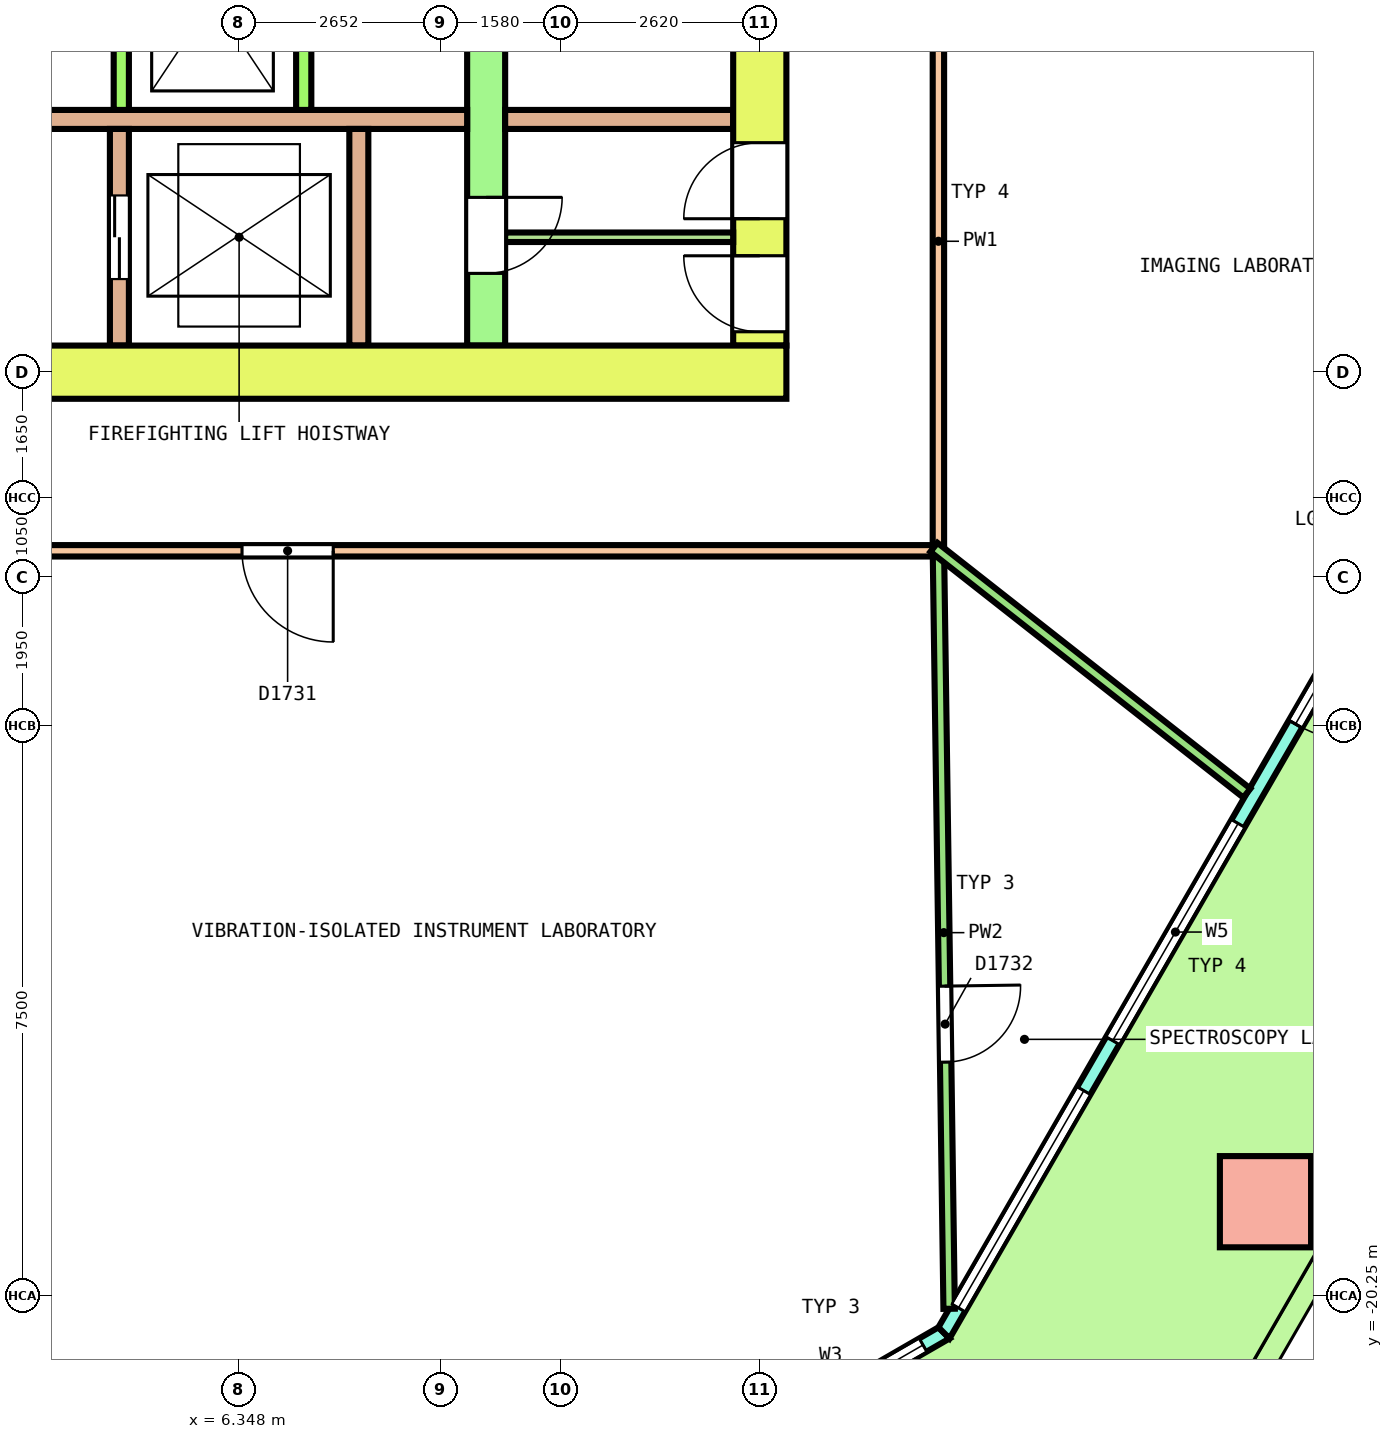
"""IFC4 building model, lengths in metres.
Left out: names, types, materials, properties, quantities, classifications, styles, units other than length and angle.
Written with IfcOpenShell. Run it as: python <this file> out.ifc"""

import sys

from ifc_helpers import new_model, si_unit, direction, frame, frame_2d, origin, origin_2d, place, context, subcontext, project, spatial, polyline, rectangle, outline, extrude, element, fill, save


model = new_model("IFC4")
c1 = context("Model", 3, precision=1e-05, world=origin(), true_north=direction((0.0, 1.0)))
c2 = subcontext(c1, "Body", "Model", "MODEL_VIEW")
j1 = project(units=[si_unit("LENGTHUNIT", "METRE"), si_unit("PLANEANGLEUNIT", "RADIAN")], contexts=[c1])
p1 = place(None, origin())
s1 = spatial("IfcSite", under=j1, at=p1, CompositionType="ELEMENT")
p2 = place(p1, origin())
s2 = spatial("IfcBuilding", under=s1, at=p2, CompositionType="ELEMENT")
p3 = place(p2, frame((0.0, 0.0, 154.0)))
s3 = spatial("IfcBuildingStorey", under=s2, at=p3, CompositionType="ELEMENT", Elevation=154.0)
p4 = place(p3, frame((19.853, -19.013, 0.0), z_axis=(-0.010847994403, -0.018863456933, 0.999763217472), x_axis=(0.498562459177, 0.866580616749, 0.02176026136)))
e1 = element("IfcColumn", 1, at=p4, inside=s3, PredefinedType="COLUMN", context=c2, shape_type="SweptSolid", body=[
    extrude(rectangle(XDim=1.2, YDim=1.2, at=origin_2d()), origin(), (0.0, 0.0, 1.0), 4.051),
])
p5 = place(p3, frame((9.67, -24.177, 0.0), z_axis=(0.0, 0.0, 1.0), x_axis=(0.866029458321, 0.49999297727, 0.0)))
e2 = element("IfcWall", 2, at=p5, inside=s3, PredefinedType="SOLIDWALL", context=c2, shape_type="SweptSolid", body=[
    extrude(outline(polyline([(-0.027, -0.1), (1.128, -0.1), (2.282, -0.1), (3.437, -0.1), (4.592, -0.1), (5.747, -0.1), (6.901, -0.1), (6.848, 0.1), (5.711, 0.1), (4.574, 0.1), (3.437, 0.1), (2.301, 0.1), (1.164, 0.1), (0.027, 0.1), (-0.027, -0.1)])), origin(), (0.0, 0.0, 1.0), 4.1),
])
p6 = place(p5, frame((0.319, 0.0, 0.1)))
e3 = element("IfcOpeningElement", 3, at=p6, cuts=e2, PredefinedType="OPENING", context=c2, shape_type="SweptSolid", body=[
    extrude(rectangle(XDim=2.8, YDim=2.9, at=frame_2d((1.4, 1.45))), frame((0.0, 0.11, 0.0), z_axis=(0.0, -1.0, 0.0), x_axis=(1.0, 0.0, 0.0)), (0.0, 0.0, 1.0), 0.22),
])
p7 = place(p5, frame((3.756, 0.0, 0.1)))
e4 = element("IfcOpeningElement", 4, at=p7, cuts=e2, PredefinedType="OPENING", context=c2, shape_type="SweptSolid", body=[
    extrude(rectangle(XDim=2.8, YDim=2.9, at=frame_2d((1.4, 1.45))), frame((0.0, 0.11, 0.0), z_axis=(0.0, -1.0, 0.0), x_axis=(1.0, 0.0, 0.0)), (0.0, 0.0, 1.0), 0.22),
])
p8 = place(p3, frame((15.624, -20.739, 0.0), z_axis=(0.0, 0.0, 1.0), x_axis=(0.500001833672, 0.866024345111, 0.0)))
e5 = element("IfcWall", 5, at=p8, inside=s3, PredefinedType="SOLIDWALL", context=c2, shape_type="SweptSolid", body=[
    extrude(outline(polyline([(-0.027, -0.1), (0.991, -0.1), (2.008, -0.1), (3.026, -0.1), (4.043, -0.1), (5.061, -0.1), (6.079, -0.1), (7.096, -0.1), (8.114, -0.1), (9.131, -0.1), (10.149, -0.1), (11.167, -0.1), (12.184, -0.1), (13.202, -0.1), (14.219, -0.1), (15.237, -0.1), (16.254, -0.1), (17.272, -0.1), (18.29, -0.1), (19.307, -0.1), (20.325, -0.1), (20.271, 0.1), (19.259, 0.1), (18.247, 0.1), (17.234, 0.1), (16.222, 0.1), (15.21, 0.1), (14.198, 0.1), (13.186, 0.1), (12.173, 0.1), (11.161, 0.1), (10.149, 0.1), (9.137, 0.1), (8.125, 0.1), (7.112, 0.1), (6.1, 0.1), (5.088, 0.1), (4.076, 0.1), (3.063, 0.1), (2.051, 0.1), (1.039, 0.1), (0.027, 0.1), (-0.027, -0.1)])), origin(), (0.0, 0.0, 1.0), 4.1),
])
p9 = place(p8, frame((0.38, 0.0, 0.1)))
e6 = element("IfcOpeningElement", 6, at=p9, cuts=e5, PredefinedType="OPENING", context=c2, shape_type="SweptSolid", body=[
    extrude(rectangle(XDim=3.3, YDim=2.9, at=frame_2d((1.65, 1.45))), frame((0.0, 0.11, 0.0), z_axis=(0.0, -1.0, 0.0), x_axis=(1.0, 0.0, 0.0)), (0.0, 0.0, 1.0), 0.22),
])
p10 = place(p8, frame((4.439, 0.0, 0.1)))
e7 = element("IfcOpeningElement", 7, at=p10, cuts=e5, PredefinedType="OPENING", context=c2, shape_type="SweptSolid", body=[
    extrude(rectangle(XDim=3.3, YDim=2.9, at=frame_2d((1.65, 1.45))), frame((0.0, 0.11, 0.0), z_axis=(0.0, -1.0, 0.0), x_axis=(1.0, 0.0, 0.0)), (0.0, 0.0, 1.0), 0.22),
])
p11 = place(p8, frame((9.249, 0.0, 0.0)))
e8 = element("IfcOpeningElement", 8, at=p11, cuts=e5, PredefinedType="OPENING", context=c2, shape_type="SweptSolid", body=[
    extrude(rectangle(XDim=1.8, YDim=2.4, at=frame_2d((0.9, 1.2))), frame((0.0, 0.11, 0.0), z_axis=(0.0, -1.0, 0.0), x_axis=(1.0, 0.0, 0.0)), (0.0, 0.0, 1.0), 0.22),
])
p12 = place(p8, frame((9.249, 0.0, 2.55)))
e9 = element("IfcOpeningElement", 9, at=p12, cuts=e5, PredefinedType="OPENING", context=c2, shape_type="SweptSolid", body=[
    extrude(rectangle(XDim=1.8, YDim=0.45, at=frame_2d((0.9, 0.225))), frame((0.0, 0.11, 0.0), z_axis=(0.0, -1.0, 0.0), x_axis=(1.0, 0.0, 0.0)), (0.0, 0.0, 1.0), 0.22),
])
p13 = place(p8, frame((12.559, 0.0, 0.1)))
e10 = element("IfcOpeningElement", 10, at=p13, cuts=e5, PredefinedType="OPENING", context=c2, shape_type="SweptSolid", body=[
    extrude(rectangle(XDim=3.3, YDim=2.9, at=frame_2d((1.65, 1.45))), frame((0.0, 0.11, 0.0), z_axis=(0.0, -1.0, 0.0), x_axis=(1.0, 0.0, 0.0)), (0.0, 0.0, 1.0), 0.22),
])
p14 = place(p8, frame((16.618, 0.0, 0.1)))
e11 = element("IfcOpeningElement", 11, at=p14, cuts=e5, PredefinedType="OPENING", context=c2, shape_type="SweptSolid", body=[
    extrude(rectangle(XDim=3.3, YDim=2.9, at=frame_2d((1.65, 1.45))), frame((0.0, 0.11, 0.0), z_axis=(0.0, -1.0, 0.0), x_axis=(1.0, 0.0, 0.0)), (0.0, 0.0, 1.0), 0.22),
])
p15 = place(p3, frame((-13.55, -8.1, 0.0), z_axis=(0.0, 0.0, 1.0), x_axis=(1.0, 0.0, 0.0)))
e12 = element("IfcWall", 12, at=p15, inside=s3, PredefinedType="SHEAR", context=c2, shape_type="SweptSolid", body=[
    extrude(rectangle(XDim=27.1, YDim=0.7, at=frame_2d((13.55, 0.0))), origin(), (0.0, 0.0, 1.0), 4.1),
])
p16 = place(p15, frame((15.1, 0.0, 0.0)))
e13 = element("IfcOpeningElement", 13, at=p16, cuts=e12, PredefinedType="OPENING", context=c2, shape_type="SweptSolid", body=[
    extrude(rectangle(XDim=1.2, YDim=2.1, at=frame_2d((0.6, 1.05))), frame((0.0, 0.36, 0.0), z_axis=(0.0, -1.0, 0.0), x_axis=(1.0, 0.0, 0.0)), (0.0, 0.0, 1.0), 0.72),
])
p17 = place(p3, frame((13.2, -7.75, 0.0), z_axis=(0.0, 0.0, 1.0), x_axis=(0.0, 1.0, 0.0)))
e14 = element("IfcWall", 14, at=p17, inside=s3, PredefinedType="SHEAR", context=c2, shape_type="SweptSolid", body=[
    extrude(rectangle(XDim=15.5, YDim=0.7, at=frame_2d((7.75, 0.0))), origin(), (0.0, 0.0, 1.0), 4.1),
])
p18 = place(p17, frame((6.55, 0.0, 0.0)))
e15 = element("IfcOpeningElement", 15, at=p18, cuts=e14, PredefinedType="OPENING", context=c2, shape_type="SweptSolid", body=[
    extrude(rectangle(XDim=2.4, YDim=2.1, at=frame_2d((1.2, 1.05))), frame((0.0, 0.36, 0.0), z_axis=(0.0, -1.0, 0.0), x_axis=(1.0, 0.0, 0.0)), (0.0, 0.0, 1.0), 0.72),
])
p19 = place(p17, frame((13.45, 0.0, 0.0)))
e16 = element("IfcOpeningElement", 16, at=p19, cuts=e14, PredefinedType="OPENING", context=c2, shape_type="SweptSolid", body=[
    extrude(rectangle(XDim=1.2, YDim=2.1, at=frame_2d((0.6, 1.05))), frame((0.0, 0.36, 0.0), z_axis=(0.0, -1.0, 0.0), x_axis=(1.0, 0.0, 0.0)), (0.0, 0.0, 1.0), 0.72),
])
p20 = place(p17, frame((0.181, 0.0, 0.0)))
e17 = element("IfcOpeningElement", 17, at=p20, cuts=e14, PredefinedType="OPENING", context=c2, shape_type="SweptSolid", body=[
    extrude(rectangle(XDim=1.0, YDim=2.1, at=frame_2d((0.5, 1.05))), frame((0.0, 0.36, 0.0), z_axis=(0.0, -1.0, 0.0), x_axis=(1.0, 0.0, 0.0)), (0.0, 0.0, 1.0), 0.72),
])
p21 = place(p17, frame((1.669, 0.0, 0.0)))
e18 = element("IfcOpeningElement", 18, at=p21, cuts=e14, PredefinedType="OPENING", context=c2, shape_type="SweptSolid", body=[
    extrude(rectangle(XDim=1.0, YDim=2.1, at=frame_2d((0.5, 1.05))), frame((0.0, 0.36, 0.0), z_axis=(0.0, -1.0, 0.0), x_axis=(1.0, 0.0, 0.0)), (0.0, 0.0, 1.0), 0.72),
])
p22 = place(p3, frame((9.6, -7.75, 0.0), z_axis=(0.0, 0.0, 1.0), x_axis=(0.0, 1.0, 0.0)))
e19 = element("IfcWall", 19, at=p22, inside=s3, PredefinedType="SHEAR", context=c2, shape_type="SweptSolid", body=[
    extrude(rectangle(XDim=15.5, YDim=0.5, at=frame_2d((7.75, 0.0))), origin(), (0.0, 0.0, 1.0), 4.1),
])
p23 = place(p22, frame((6.55, 0.0, 0.0)))
e20 = element("IfcOpeningElement", 20, at=p23, cuts=e19, PredefinedType="OPENING", context=c2, shape_type="SweptSolid", body=[
    extrude(rectangle(XDim=2.4, YDim=2.1, at=frame_2d((1.2, 1.05))), frame((0.0, 0.26, 0.0), z_axis=(0.0, -1.0, 0.0), x_axis=(1.0, 0.0, 0.0)), (0.0, 0.0, 1.0), 0.52),
])
p24 = place(p22, frame((13.45, 0.0, 0.0)))
e21 = element("IfcOpeningElement", 21, at=p24, cuts=e19, PredefinedType="OPENING", context=c2, shape_type="SweptSolid", body=[
    extrude(rectangle(XDim=1.2, YDim=2.1, at=frame_2d((0.6, 1.05))), frame((0.0, 0.26, 0.0), z_axis=(0.0, -1.0, 0.0), x_axis=(1.0, 0.0, 0.0)), (0.0, 0.0, 1.0), 0.52),
])
p25 = place(p22, frame((0.95, 0.0, 0.0)))
e22 = element("IfcOpeningElement", 22, at=p25, cuts=e19, PredefinedType="OPENING", context=c2, shape_type="SweptSolid", body=[
    extrude(rectangle(XDim=1.0, YDim=2.1, at=frame_2d((0.5, 1.05))), frame((0.0, 0.26, 0.0), z_axis=(0.0, -1.0, 0.0), x_axis=(1.0, 0.0, 0.0)), (0.0, 0.0, 1.0), 0.52),
])
p26 = place(p3, frame((-9.35, -4.775, 0.0), z_axis=(0.0, 0.0, 1.0), x_axis=(1.0, 0.0, 0.0)))
e23 = element("IfcWall", 23, at=p26, inside=s3, PredefinedType="SOLIDWALL", context=c2, shape_type="SweptSolid", body=[
    extrude(rectangle(XDim=18.7, YDim=0.25, at=frame_2d((9.35, 0.0))), origin(), (0.0, 0.0, 1.0), 4.1),
])
p27 = place(p3, frame((9.85, -4.775, 0.0), z_axis=(0.0, 0.0, 1.0), x_axis=(1.0, 0.0, 0.0)))
e24 = element("IfcWall", 24, at=p27, inside=s3, PredefinedType="SOLIDWALL", context=c2, shape_type="SweptSolid", body=[
    extrude(rectangle(XDim=3.0, YDim=0.25, at=frame_2d((1.5, 0.0))), origin(), (0.0, 0.0, 1.0), 4.1),
])
for number, where, z_axis, x_axis in (
    (25, (4.8, -4.65, 0.0), (0.0, 0.0, 1.0), (0.0, 1.0, 0.0)),
    (26, (7.2, -4.65, 0.0), (0.0, 0.0, 1.0), (0.0, 1.0, 0.0)),
):
    element("IfcWall", number, at=place(p3, frame(where, z_axis=z_axis, x_axis=x_axis)), inside=s3, PredefinedType="SOLIDWALL", context=c2, shape_type="SweptSolid", body=[
        extrude(rectangle(XDim=2.9, YDim=0.2, at=frame_2d((1.45, 0.0))), origin(), (0.0, 0.0, 1.0), 4.1),
    ])
p28 = place(p3, frame((4.775, -7.75, 0.0), z_axis=(0.0, 0.0, 1.0), x_axis=(0.0, 1.0, 0.0)))
e27 = element("IfcWall", 27, at=p28, inside=s3, PredefinedType="SOLIDWALL", context=c2, shape_type="SweptSolid", body=[
    extrude(rectangle(XDim=2.85, YDim=0.25, at=frame_2d((1.425, 0.0))), origin(), (0.0, 0.0, 1.0), 4.1),
])
p29 = place(p28, frame((0.875, 0.0, 0.0)))
e28 = element("IfcOpeningElement", 28, at=p29, cuts=e27, PredefinedType="OPENING", context=c2, shape_type="SweptSolid", body=[
    extrude(rectangle(XDim=1.1, YDim=2.1, at=frame_2d((0.55, 1.05))), frame((0.0, 0.135, 0.0), z_axis=(0.0, -1.0, 0.0), x_axis=(1.0, 0.0, 0.0)), (0.0, 0.0, 1.0), 0.27),
])
p30 = place(p3, frame((7.925, -7.75, 0.0), z_axis=(0.0, 0.0, 1.0), x_axis=(0.0, 1.0, 0.0)))
e29 = element("IfcWall", 29, at=p30, inside=s3, PredefinedType="SOLIDWALL", context=c2, shape_type="SweptSolid", body=[
    extrude(rectangle(XDim=2.85, YDim=0.25, at=frame_2d((1.425, 0.0))), origin(), (0.0, 0.0, 1.0), 4.1),
])
p31 = place(p3, frame((9.85, -6.325, 0.0), z_axis=(0.0, 0.0, 1.0), x_axis=(1.0, 0.0, 0.0)))
e30 = element("IfcWall", 30, at=p31, inside=s3, PredefinedType="PARTITIONING", context=c2, shape_type="SweptSolid", body=[
    extrude(rectangle(XDim=3.0, YDim=0.125, at=frame_2d((1.5, 0.0))), origin(), (0.0, 0.0, 1.0), 4.1),
])
p32 = place(p3, frame((15.55, -10.375, 0.0), z_axis=(0.0, 0.0, 1.0), x_axis=(0.0, 1.0, 0.0)))
e31 = element("IfcWall", 31, at=p32, inside=s3, PredefinedType="PARTITIONING", context=c2, shape_type="SweptSolid", body=[
    extrude(rectangle(XDim=7.994, YDim=0.15, at=frame_2d((3.997, 0.0))), origin(), (0.0, 0.0, 1.0), 3.05),
])
p33 = place(p3, frame((-15.475, -10.45, 0.0), z_axis=(0.0, 0.0, 1.0), x_axis=(1.0, 0.0, 0.0)))
e32 = element("IfcWall", 32, at=p33, inside=s3, PredefinedType="PARTITIONING", context=c2, shape_type="SweptSolid", body=[
    extrude(rectangle(XDim=30.95, YDim=0.15, at=frame_2d((15.475, 0.0))), origin(), (0.0, 0.0, 1.0), 3.05),
])
p34 = place(p33, frame((10.408, 0.0, 0.0)))
e33 = element("IfcOpeningElement", 33, at=p34, cuts=e32, PredefinedType="OPENING", context=c2, shape_type="SweptSolid", body=[
    extrude(rectangle(XDim=1.2, YDim=2.1, at=frame_2d((0.6, 1.05))), frame((0.0, 0.085, 0.0), z_axis=(0.0, -1.0, 0.0), x_axis=(1.0, 0.0, 0.0)), (0.0, 0.0, 1.0), 0.17),
])
p35 = place(p33, frame((21.863, 0.0, 0.0)))
e34 = element("IfcOpeningElement", 34, at=p35, cuts=e32, PredefinedType="OPENING", context=c2, shape_type="SweptSolid", body=[
    extrude(rectangle(XDim=1.2, YDim=2.1, at=frame_2d((0.6, 1.05))), frame((0.0, 0.085, 0.0), z_axis=(0.0, -1.0, 0.0), x_axis=(1.0, 0.0, 0.0)), (0.0, 0.0, 1.0), 0.17),
])
p36 = place(p3, frame((15.551, -10.525, 0.0), z_axis=(0.0, 0.0, 1.0), x_axis=(0.014157785589, -0.999899773531, 0.0)))
e35 = element("IfcWall", 35, at=p36, inside=s3, PredefinedType="PARTITIONING", context=c2, shape_type="SweptSolid", body=[
    extrude(rectangle(XDim=9.898, YDim=0.15, at=frame_2d((4.949, 0.0))), origin(), (0.0, 0.0, 1.0), 3.05),
])
p37 = place(p36, frame((5.653, 0.0, 0.0)))
e36 = element("IfcOpeningElement", 36, at=p37, cuts=e35, PredefinedType="OPENING", context=c2, shape_type="SweptSolid", body=[
    extrude(rectangle(XDim=1.0, YDim=2.1, at=frame_2d((0.5, 1.05))), frame((0.0, 0.085, 0.0), z_axis=(0.0, -1.0, 0.0), x_axis=(1.0, 0.0, 0.0)), (0.0, 0.0, 1.0), 0.17),
])
p38 = place(p3, frame((15.491, -10.404, 0.0), z_axis=(0.0, 0.0, 1.0), x_axis=(0.78641541947, -0.617697974757, 0.0)))
e37 = element("IfcWall", 37, at=p38, inside=s3, PredefinedType="PARTITIONING", context=c2, shape_type="SweptSolid", body=[
    extrude(rectangle(XDim=5.235, YDim=0.15, at=frame_2d((2.618, 0.0))), origin(), (0.0, 0.0, 1.0), 3.05),
])
p39 = place(p7, origin())
e38 = element("IfcWindow", 38, at=p39, inside=s3, PartitioningType="SINGLE_PANEL", PredefinedType="WINDOW", context=c2, shape_type="SweptSolid", body=[
    extrude(rectangle(XDim=2.8, YDim=2.9, at=frame_2d((1.4, 1.45))), frame((0.0, 0.03, 0.0), z_axis=(0.0, -1.0, 0.0), x_axis=(1.0, 0.0, 0.0)), (0.0, 0.0, 1.0), 0.06),
])
fill(e4, e38)
p40 = place(p9, origin())
e39 = element("IfcWindow", 39, at=p40, inside=s3, PartitioningType="SINGLE_PANEL", PredefinedType="WINDOW", context=c2, shape_type="SweptSolid", body=[
    extrude(rectangle(XDim=3.3, YDim=2.9, at=frame_2d((1.65, 1.45))), frame((0.0, 0.03, 0.0), z_axis=(0.0, -1.0, 0.0), x_axis=(1.0, 0.0, 0.0)), (0.0, 0.0, 1.0), 0.06),
])
fill(e6, e39)
p41 = place(p10, origin())
e40 = element("IfcWindow", 40, at=p41, inside=s3, PartitioningType="SINGLE_PANEL", PredefinedType="WINDOW", context=c2, shape_type="SweptSolid", body=[
    extrude(rectangle(XDim=3.3, YDim=2.9, at=frame_2d((1.65, 1.45))), frame((0.0, 0.03, 0.0), z_axis=(0.0, -1.0, 0.0), x_axis=(1.0, 0.0, 0.0)), (0.0, 0.0, 1.0), 0.06),
])
fill(e7, e40)
p42 = place(p11, origin())
e41 = element("IfcDoor", 41, at=p42, inside=s3, OperationType="DOUBLE_DOOR_SINGLE_SWING", PredefinedType="DOOR", context=c2, shape_type="SweptSolid", body=[
    extrude(rectangle(XDim=1.8, YDim=2.4, at=frame_2d((0.9, 1.2))), frame((0.0, 0.025, 0.0), z_axis=(0.0, -1.0, 0.0), x_axis=(1.0, 0.0, 0.0)), (0.0, 0.0, 1.0), 0.05),
])
fill(e8, e41)
p43 = place(p12, origin())
e42 = element("IfcWindow", 42, at=p43, inside=s3, PartitioningType="SINGLE_PANEL", PredefinedType="WINDOW", context=c2, shape_type="SweptSolid", body=[
    extrude(rectangle(XDim=1.8, YDim=0.45, at=frame_2d((0.9, 0.225))), frame((0.0, 0.03, 0.0), z_axis=(0.0, -1.0, 0.0), x_axis=(1.0, 0.0, 0.0)), (0.0, 0.0, 1.0), 0.06),
])
fill(e9, e42)
p44 = place(p29, origin())
e43 = element("IfcDoor", 43, at=p44, inside=s3, OperationType="DOUBLE_DOOR_SLIDING", PredefinedType="DOOR", context=c2, shape_type="SweptSolid", body=[
    extrude(rectangle(XDim=1.1, YDim=2.1, at=frame_2d((0.55, 1.05))), frame((0.0, 0.075, 0.0), z_axis=(0.0, -1.0, 0.0), x_axis=(1.0, 0.0, 0.0)), (0.0, 0.0, 1.0), 0.15),
])
fill(e28, e43)
p45 = place(p25, origin())
e44 = element("IfcDoor", 44, at=p45, inside=s3, OperationType="SINGLE_SWING_RIGHT", PredefinedType="DOOR", context=c2, shape_type="SweptSolid", body=[
    extrude(rectangle(XDim=1.0, YDim=2.1, at=frame_2d((0.5, 1.05))), frame((0.0, 0.2, 0.0), z_axis=(0.0, -1.0, 0.0), x_axis=(1.0, 0.0, 0.0)), (0.0, 0.0, 1.0), 0.4),
])
fill(e22, e44)
p46 = place(p20, origin())
e45 = element("IfcDoor", 45, at=p46, inside=s3, OperationType="SINGLE_SWING_LEFT", PredefinedType="DOOR", context=c2, shape_type="SweptSolid", body=[
    extrude(rectangle(XDim=1.0, YDim=2.1, at=frame_2d((0.5, 1.05))), frame((0.0, 0.3, 0.0), z_axis=(0.0, -1.0, 0.0), x_axis=(1.0, 0.0, 0.0)), (0.0, 0.0, 1.0), 0.6),
])
fill(e17, e45)
p47 = place(p21, origin())
e46 = element("IfcDoor", 46, at=p47, inside=s3, OperationType="SINGLE_SWING_RIGHT", PredefinedType="DOOR", context=c2, shape_type="SweptSolid", body=[
    extrude(rectangle(XDim=1.0, YDim=2.1, at=frame_2d((0.5, 1.05))), frame((0.0, 0.3, 0.0), z_axis=(0.0, -1.0, 0.0), x_axis=(1.0, 0.0, 0.0)), (0.0, 0.0, 1.0), 0.6),
])
fill(e18, e46)
p48 = place(p35, origin())
e47 = element("IfcDoor", 47, at=p48, inside=s3, OperationType="DOUBLE_DOOR_SINGLE_SWING", PredefinedType="DOOR", context=c2, shape_type="SweptSolid", body=[
    extrude(rectangle(XDim=1.2, YDim=2.1, at=frame_2d((0.6, 1.05))), frame((0.0, 0.025, 0.0), z_axis=(0.0, -1.0, 0.0), x_axis=(1.0, 0.0, 0.0)), (0.0, 0.0, 1.0), 0.05),
])
fill(e34, e47)
p49 = place(p37, origin())
e48 = element("IfcDoor", 48, at=p49, inside=s3, OperationType="SINGLE_SWING_RIGHT", PredefinedType="DOOR", context=c2, shape_type="SweptSolid", body=[
    extrude(rectangle(XDim=1.0, YDim=2.1, at=frame_2d((0.5, 1.05))), frame((0.0, 0.025, 0.0), z_axis=(0.0, -1.0, 0.0), x_axis=(1.0, 0.0, 0.0)), (0.0, 0.0, 1.0), 0.05),
])
fill(e36, e48)
save(model, sys.argv[1])
